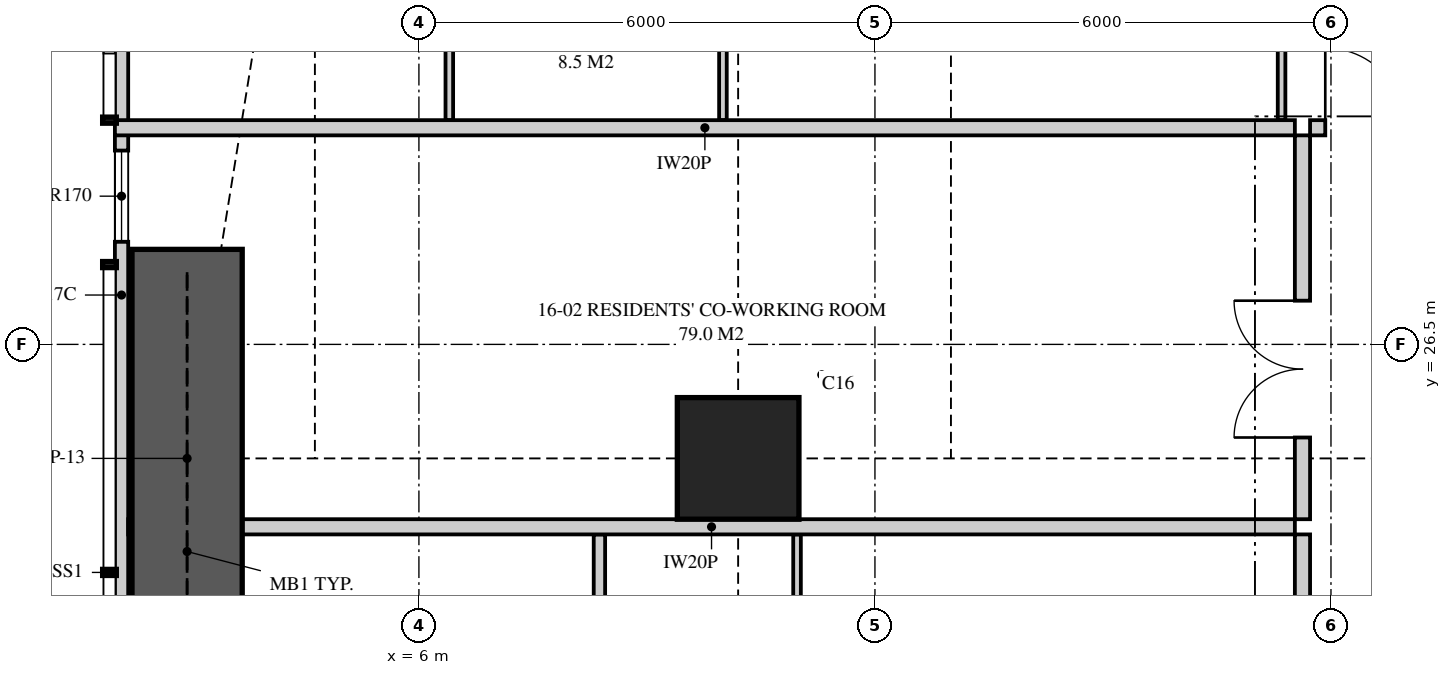
"""IFC4 building model, lengths in metres.
Left out: names, types, materials, properties, quantities, classifications, styles, units other than length and angle.
Written with IfcOpenShell. Run it as: python <this file> out.ifc"""

import sys

from ifc_helpers import new_model, si_unit, direction, frame, frame_2d, origin, origin_2d, place, context, subcontext, project, spatial, polyline, rectangle, outline, extrude, element, fill, save


model = new_model("IFC4")
c1 = context("Model", 3, precision=1e-05, world=origin(), true_north=direction((0.0, 1.0)))
c2 = subcontext(c1, "Body", "Model", "MODEL_VIEW")
j1 = project(units=[si_unit("LENGTHUNIT", "METRE"), si_unit("PLANEANGLEUNIT", "RADIAN")], contexts=[c1])
p1 = place(None, origin())
s1 = spatial("IfcSite", under=j1, at=p1, CompositionType="ELEMENT")
p2 = place(p1, origin())
s2 = spatial("IfcBuilding", under=s1, at=p2, CompositionType="ELEMENT")
p3 = place(p2, frame((0.0, 0.0, 61.2)))
s3 = spatial("IfcBuildingStorey", under=s2, at=p3, CompositionType="ELEMENT", Elevation=61.2)
p4 = place(p3, frame((10.2, 25.0, 0.0), z_axis=(0.0, 0.0, 1.0), x_axis=(1.0, 0.0, 0.0)))
e1 = element("IfcColumn", 1, at=p4, inside=s3, PredefinedType="COLUMN", context=c2, shape_type="SweptSolid", body=[
    extrude(rectangle(XDim=1.6, YDim=1.6, at=origin_2d()), origin(), (0.0, 0.0, 1.0), 3.35),
])
p5 = place(p3, frame((2.087, 34.949, 0.0), z_axis=(0.0, 0.0, 1.0), x_axis=(0.0, -1.0, 0.0)))
e2 = element("IfcWall", 2, at=p5, inside=s3, PredefinedType="SOLIDWALL", context=c2, shape_type="SweptSolid", body=[
    extrude(outline(polyline([(0.0, 0.0), (15.599, 0.0), (15.599, 2.15), (9.949, 2.15), (9.949, 3.11), (9.823, 3.11), (9.823, 2.15), (9.73, 2.15), (9.73, 3.11), (0.0, 3.11), (0.0, 0.0)])), frame((0.0, 0.087, 0.0), z_axis=(0.0, -1.0, 0.0), x_axis=(1.0, 0.0, 0.0)), (0.0, 0.0, 1.0), 0.175),
])
p6 = place(p5, frame((2.722, 0.0, 0.4)))
e3 = element("IfcOpeningElement", 3, at=p6, cuts=e2, PredefinedType="OPENING", context=c2, shape_type="SweptSolid", body=[
    extrude(rectangle(XDim=1.8, YDim=1.7, at=frame_2d((0.9, 0.85))), frame((0.0, 0.097, 0.0), z_axis=(0.0, -1.0, 0.0), x_axis=(1.0, 0.0, 0.0)), (0.0, 0.0, 1.0), 0.195),
])
p7 = place(p5, frame((5.899, 0.0, 0.4)))
e4 = element("IfcOpeningElement", 4, at=p7, cuts=e2, PredefinedType="OPENING", context=c2, shape_type="SweptSolid", body=[
    extrude(rectangle(XDim=1.2, YDim=1.7, at=frame_2d((0.6, 0.85))), frame((0.0, 0.097, 0.0), z_axis=(0.0, -1.0, 0.0), x_axis=(1.0, 0.0, 0.0)), (0.0, 0.0, 1.0), 0.195),
])
p8 = place(p5, frame((12.824, 0.0, 0.4)))
e5 = element("IfcOpeningElement", 5, at=p8, cuts=e2, PredefinedType="OPENING", context=c2, shape_type="SweptSolid", body=[
    extrude(rectangle(XDim=1.8, YDim=1.7, at=frame_2d((0.9, 0.85))), frame((0.0, 0.097, 0.0), z_axis=(0.0, -1.0, 0.0), x_axis=(1.0, 0.0, 0.0)), (0.0, 0.0, 1.0), 0.195),
])
p9 = place(p3, frame((17.725, 29.35, 0.0), z_axis=(0.0, 0.0, 1.0), x_axis=(1.0, 0.0, 0.0)))
e6 = element("IfcWall", 6, at=p9, inside=s3, PredefinedType="PARTITIONING", context=c2, shape_type="SweptSolid", body=[
    extrude(outline(polyline([(0.0, 0.0), (15.275, 0.0), (15.275, 3.11), (6.612, 3.11), (6.612, 2.541), (5.938, 2.541), (5.938, 3.11), (0.0, 3.11), (0.0, 0.0)])), frame((0.0, 0.1, 0.0), z_axis=(0.0, -1.0, 0.0), x_axis=(1.0, 0.0, 0.0)), (0.0, 0.0, 1.0), 0.2),
])
p10 = place(p9, frame((0.2, 0.0, 0.0)))
e7 = element("IfcOpeningElement", 7, at=p10, cuts=e6, PredefinedType="OPENING", context=c2, shape_type="SweptSolid", body=[
    extrude(rectangle(XDim=1.05, YDim=2.2, at=frame_2d((0.525, 1.1))), frame((0.0, 0.11, 0.0), z_axis=(0.0, -1.0, 0.0), x_axis=(1.0, 0.0, 0.0)), (0.0, 0.0, 1.0), 0.22),
])
p11 = place(p3, frame((6.4, 37.825, 0.0), z_axis=(0.0, 0.0, 1.0), x_axis=(0.0, -1.0, 0.0)))
e8 = element("IfcWall", 8, at=p11, inside=s3, PredefinedType="PARTITIONING", context=c2, shape_type="SweptSolid", body=[
    extrude(outline(polyline([(0.0, 0.0), (8.375, 0.0), (8.375, 3.11), (2.978, 3.11), (2.978, 2.15), (1.224, 2.15), (1.224, 3.11), (0.0, 3.11), (0.0, 0.0)])), frame((0.0, 0.05, 0.0), z_axis=(0.0, -1.0, 0.0), x_axis=(1.0, 0.0, 0.0)), (0.0, 0.0, 1.0), 0.1),
])
p12 = place(p11, frame((3.422, 0.0, 0.0)))
e9 = element("IfcOpeningElement", 9, at=p12, cuts=e8, PredefinedType="OPENING", context=c2, shape_type="SweptSolid", body=[
    extrude(rectangle(XDim=0.9, YDim=2.1, at=frame_2d((0.45, 1.05))), frame((0.0, 0.06, 0.0), z_axis=(0.0, -1.0, 0.0), x_axis=(1.0, 0.0, 0.0)), (0.0, 0.0, 1.0), 0.12),
])
p13 = place(p11, frame((6.023, 0.0, 0.0)))
e10 = element("IfcOpeningElement", 10, at=p13, cuts=e8, PredefinedType="OPENING", context=c2, shape_type="SweptSolid", body=[
    extrude(rectangle(XDim=0.9, YDim=2.1, at=frame_2d((0.45, 1.05))), frame((0.0, 0.06, 0.0), z_axis=(0.0, -1.0, 0.0), x_axis=(1.0, 0.0, 0.0)), (0.0, 0.0, 1.0), 0.12),
])
p14 = place(p3, frame((10.0, 36.487, 0.0), z_axis=(0.0, 0.0, 1.0), x_axis=(0.0, -1.0, 0.0)))
e11 = element("IfcWall", 11, at=p14, inside=s3, PredefinedType="PARTITIONING", context=c2, shape_type="SweptSolid", body=[
    extrude(outline(polyline([(0.0, 0.0), (7.037, 0.0), (7.037, 2.51), (0.917, 2.51), (0.917, 2.15), (0.0, 2.15), (0.0, 0.0)])), frame((0.0, 0.05, 0.0), z_axis=(0.0, -1.0, 0.0), x_axis=(1.0, 0.0, 0.0)), (0.0, 0.0, 1.0), 0.1),
])
p15 = place(p14, frame((3.188, 0.0, 0.0)))
e12 = element("IfcOpeningElement", 12, at=p15, cuts=e11, PredefinedType="OPENING", context=c2, shape_type="SweptSolid", body=[
    extrude(rectangle(XDim=0.9, YDim=2.1, at=frame_2d((0.45, 1.05))), frame((0.0, 0.06, 0.0), z_axis=(0.0, -1.0, 0.0), x_axis=(1.0, 0.0, 0.0)), (0.0, 0.0, 1.0), 0.12),
])
p16 = place(p14, frame((4.612, 0.0, 0.0)))
e13 = element("IfcOpeningElement", 13, at=p16, cuts=e11, PredefinedType="OPENING", context=c2, shape_type="SweptSolid", body=[
    extrude(rectangle(XDim=0.9, YDim=2.1, at=frame_2d((0.45, 1.05))), frame((0.0, 0.06, 0.0), z_axis=(0.0, -1.0, 0.0), x_axis=(1.0, 0.0, 0.0)), (0.0, 0.0, 1.0), 0.12),
])
p17 = place(p3, frame((17.35, 37.825, 0.0), z_axis=(0.0, 0.0, 1.0), x_axis=(0.0, -1.0, 0.0)))
e14 = element("IfcWall", 14, at=p17, inside=s3, PredefinedType="PARTITIONING", context=c2, shape_type="SweptSolid", body=[
    extrude(outline(polyline([(0.0, 0.0), (8.375, 0.0), (8.375, 3.11), (1.635, 3.11), (1.635, 2.15), (0.0, 2.15), (0.0, 3.11), (0.0, 0.0)])), frame((0.0, 0.05, 0.0), z_axis=(0.0, -1.0, 0.0), x_axis=(1.0, 0.0, 0.0)), (0.0, 0.0, 1.0), 0.1),
])
p18 = place(p17, frame((3.688, 0.0, 0.0)))
e15 = element("IfcOpeningElement", 15, at=p18, cuts=e14, PredefinedType="OPENING", context=c2, shape_type="SweptSolid", body=[
    extrude(rectangle(XDim=1.0, YDim=2.1, at=frame_2d((0.5, 1.05))), frame((0.0, 0.06, 0.0), z_axis=(0.0, -1.0, 0.0), x_axis=(1.0, 0.0, 0.0)), (0.0, 0.0, 1.0), 0.12),
])
p19 = place(p3, frame((2.0, 29.35, 0.0), z_axis=(0.0, 0.0, 1.0), x_axis=(1.0, 0.0, 0.0)))
e16 = element("IfcWall", 16, at=p19, inside=s3, PredefinedType="PARTITIONING", context=c2, shape_type="SweptSolid", body=[
    extrude(outline(polyline([(0.0, 0.0), (15.525, 0.0), (15.525, 3.11), (11.337, 3.11), (11.337, 2.541), (10.663, 2.541), (10.663, 3.11), (9.51, 3.11), (9.51, 2.51), (6.89, 2.51), (6.89, 3.11), (2.969, 3.11), (2.969, 2.541), (2.577, 2.541), (2.577, 2.15), (0.733, 2.15), (0.733, 3.11), (0.0, 3.11), (0.0, 0.0)])), frame((0.0, 0.1, 0.0), z_axis=(0.0, -1.0, 0.0), x_axis=(1.0, 0.0, 0.0)), (0.0, 0.0, 1.0), 0.2),
])
p20 = place(p3, frame((2.175, 24.1, 0.0), z_axis=(0.0, 0.0, 1.0), x_axis=(1.0, 0.0, 0.0)))
e17 = element("IfcWall", 17, at=p20, inside=s3, PredefinedType="PARTITIONING", context=c2, shape_type="SweptSolid", body=[
    extrude(outline(polyline([(0.529, 2.15), (0.0, 2.15), (0.0, 0.0), (0.529, 0.0), (0.529, 0.889), (1.021, 0.889), (1.021, 0.0), (15.35, 0.0), (15.35, 3.11), (9.335, 3.11), (9.335, 2.51), (6.715, 2.51), (6.715, 3.11), (1.685, 3.11), (1.685, 2.15), (1.021, 2.15), (1.021, 1.261), (0.529, 1.261), (0.529, 2.15)])), frame((0.0, 0.1, 0.0), z_axis=(0.0, -1.0, 0.0), x_axis=(1.0, 0.0, 0.0)), (0.0, 0.0, 1.0), 0.2),
])
p21 = place(p3, frame((17.625, 7.75, 0.0), z_axis=(0.0, 0.0, 1.0), x_axis=(0.0, 1.0, 0.0)))
e18 = element("IfcWall", 18, at=p21, inside=s3, PredefinedType="PARTITIONING", context=c2, shape_type="SweptSolid", body=[
    extrude(outline(polyline([(0.0, 0.0), (16.25, 0.0), (16.25, 3.11), (5.587, 3.11), (5.587, 2.541), (4.913, 2.541), (4.913, 3.11), (0.0, 3.11), (0.0, 0.0)])), frame((0.0, 0.1, 0.0), z_axis=(0.0, -1.0, 0.0), x_axis=(1.0, 0.0, 0.0)), (0.0, 0.0, 1.0), 0.2),
])
p22 = place(p21, frame((7.075, 0.0, 0.0)))
e19 = element("IfcOpeningElement", 19, at=p22, cuts=e18, PredefinedType="OPENING", context=c2, shape_type="SweptSolid", body=[
    extrude(rectangle(XDim=1.05, YDim=2.2, at=frame_2d((0.525, 1.1))), frame((0.0, 0.11, 0.0), z_axis=(0.0, -1.0, 0.0), x_axis=(1.0, 0.0, 0.0)), (0.0, 0.0, 1.0), 0.22),
])
p23 = place(p3, frame((8.375, 19.45, 0.0), z_axis=(0.0, 0.0, 1.0), x_axis=(0.0, 1.0, 0.0)))
e20 = element("IfcWall", 20, at=p23, inside=s3, PredefinedType="PLUMBINGWALL", context=c2, shape_type="SweptSolid", body=[
    extrude(rectangle(XDim=4.55, YDim=0.15, at=frame_2d((2.275, 0.0))), origin(), (0.0, 0.0, 1.0), 3.11),
])
p24 = place(p23, frame((0.4, 0.0, 0.0)))
e21 = element("IfcOpeningElement", 21, at=p24, cuts=e20, PredefinedType="OPENING", context=c2, shape_type="SweptSolid", body=[
    extrude(rectangle(XDim=0.9, YDim=2.1, at=frame_2d((0.45, 1.05))), frame((0.0, 0.085, 0.0), z_axis=(0.0, -1.0, 0.0), x_axis=(1.0, 0.0, 0.0)), (0.0, 0.0, 1.0), 0.17),
])
p25 = place(p3, frame((10.975, 19.45, 0.0), z_axis=(0.0, 0.0, 1.0), x_axis=(0.0, 1.0, 0.0)))
e22 = element("IfcWall", 22, at=p25, inside=s3, PredefinedType="PARTITIONING", context=c2, shape_type="SweptSolid", body=[
    extrude(outline(polyline([(0.0, 0.0), (4.55, 0.0), (4.55, 3.11), (4.55, 2.51), (0.0, 2.51), (0.0, 3.11), (0.0, 0.0)])), frame((0.0, 0.05, 0.0), z_axis=(0.0, -1.0, 0.0), x_axis=(1.0, 0.0, 0.0)), (0.0, 0.0, 1.0), 0.1),
])
p26 = place(p3, frame((17.625, 24.2, 0.0), z_axis=(0.0, 0.0, 1.0), x_axis=(0.0, 1.0, 0.0)))
e23 = element("IfcWall", 23, at=p26, inside=s3, PredefinedType="PARTITIONING", context=c2, shape_type="SweptSolid", body=[
    extrude(outline(polyline([(0.0, 0.0), (5.05, 0.0), (5.05, 3.11), (1.137, 3.11), (1.137, 2.541), (0.463, 2.541), (0.463, 3.11), (0.0, 3.11), (0.0, 0.0)])), frame((0.0, 0.1, 0.0), z_axis=(0.0, -1.0, 0.0), x_axis=(1.0, 0.0, 0.0)), (0.0, 0.0, 1.0), 0.2),
])
p27 = place(p26, frame((1.075, 0.0, 0.0)))
e24 = element("IfcOpeningElement", 24, at=p27, cuts=e23, PredefinedType="OPENING", context=c2, shape_type="SweptSolid", body=[
    extrude(rectangle(XDim=1.8, YDim=2.1, at=frame_2d((0.9, 1.05))), frame((0.0, 0.11, 0.0), z_axis=(0.0, -1.0, 0.0), x_axis=(1.0, 0.0, 0.0)), (0.0, 0.0, 1.0), 0.22),
])
p28 = place(p3, frame((2.95, 22.25, 0.0), z_axis=(0.0, 0.0, 1.0), x_axis=(0.0, 1.0, 0.0)))
e25 = element("IfcWall", 25, at=p28, inside=s3, PredefinedType="SHEAR", context=c2, shape_type="SweptSolid", body=[
    extrude(rectangle(XDim=5.5, YDim=1.45, at=frame_2d((2.75, 0.0))), origin(), (0.0, 0.0, 1.0), 3.35),
])
p29 = place(p7, origin())
e26 = element("IfcWindow", 26, at=p29, inside=s3, PartitioningType="SINGLE_PANEL", PredefinedType="WINDOW", context=c2, shape_type="SweptSolid", body=[
    extrude(rectangle(XDim=1.2, YDim=1.7, at=frame_2d((0.6, 0.85))), frame((0.0, 0.03, 0.0), z_axis=(0.0, -1.0, 0.0), x_axis=(1.0, 0.0, 0.0)), (0.0, 0.0, 1.0), 0.06),
])
fill(e4, e26)
p30 = place(p10, origin())
e27 = element("IfcDoor", 27, at=p30, inside=s3, OperationType="SINGLE_SWING_LEFT", PredefinedType="DOOR", context=c2, shape_type="SweptSolid", body=[
    extrude(rectangle(XDim=1.05, YDim=2.2, at=frame_2d((0.525, 1.1))), frame((0.0, 0.025, 0.0), z_axis=(0.0, -1.0, 0.0), x_axis=(1.0, 0.0, 0.0)), (0.0, 0.0, 1.0), 0.05),
])
fill(e7, e27)
p31 = place(p27, origin())
e28 = element("IfcDoor", 28, at=p31, inside=s3, OperationType="DOUBLE_DOOR_SINGLE_SWING", PredefinedType="DOOR", context=c2, shape_type="SweptSolid", body=[
    extrude(rectangle(XDim=1.8, YDim=2.1, at=frame_2d((0.9, 1.05))), frame((0.0, 0.025, 0.0), z_axis=(0.0, -1.0, 0.0), x_axis=(1.0, 0.0, 0.0)), (0.0, 0.0, 1.0), 0.05),
])
fill(e24, e28)
save(model, sys.argv[1])
